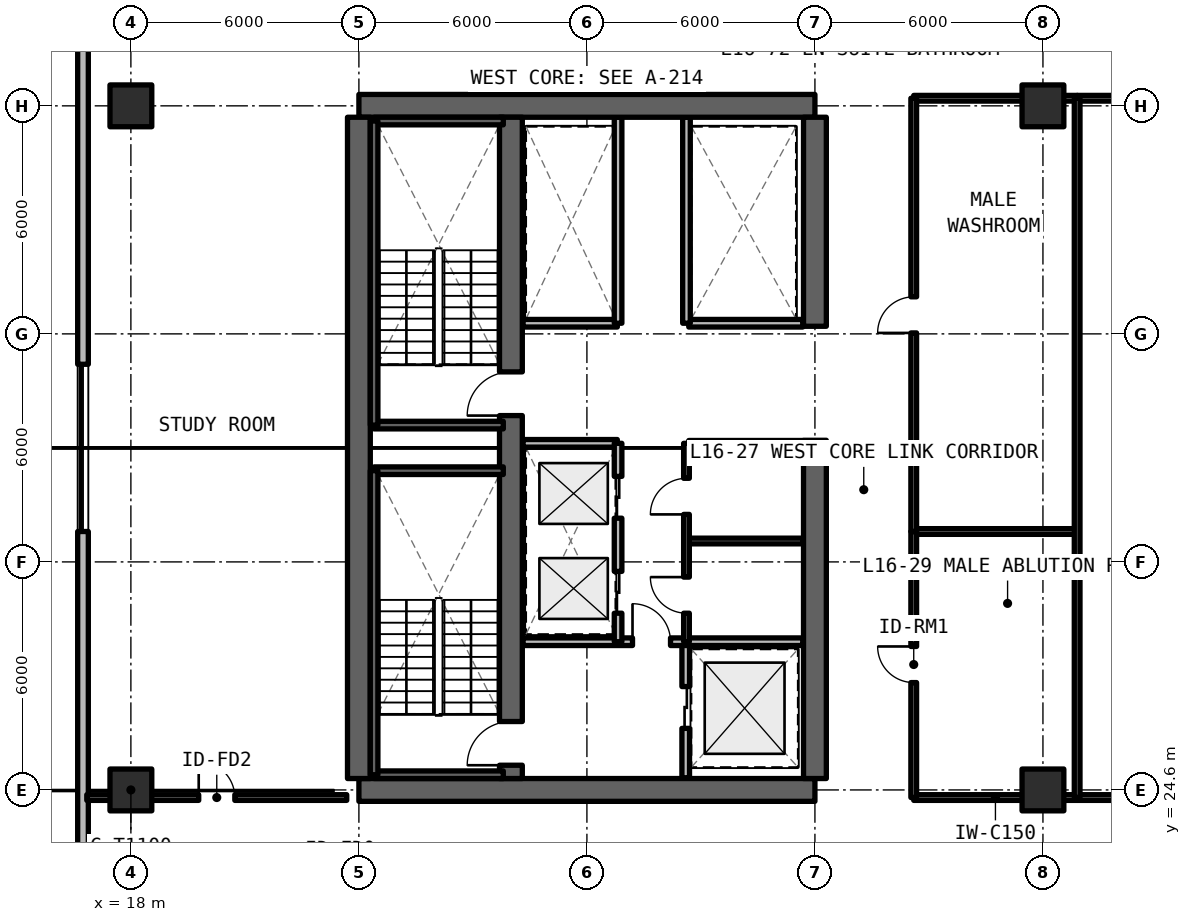
"""IFC4 building model, lengths in metres.
Left out: names, types, materials, properties, quantities, classifications, styles, units other than length and angle.
Written with IfcOpenShell. Run it as: python <this file> out.ifc"""

import sys

from ifc_helpers import new_model, si_unit, direction, frame, frame_2d, origin, origin_2d, place, context, subcontext, project, spatial, rectangle, extrude, element, fill, save


model = new_model("IFC4")
c1 = context("Model", 3, precision=1e-05, world=origin(), true_north=direction((0.0, 1.0)))
c2 = subcontext(c1, "Body", "Model", "MODEL_VIEW")
j1 = project(units=[si_unit("LENGTHUNIT", "METRE"), si_unit("PLANEANGLEUNIT", "RADIAN")], contexts=[c1])
p1 = place(None, origin())
s1 = spatial("IfcSite", under=j1, at=p1, CompositionType="ELEMENT")
p2 = place(p1, origin())
s2 = spatial("IfcBuilding", under=s1, at=p2, CompositionType="ELEMENT")
p3 = place(p2, frame((0.0, 0.0, 58.74)))
s3 = spatial("IfcBuildingStorey", under=s2, at=p3, CompositionType="ELEMENT", Elevation=58.74)
for number, where, z_axis, x_axis in (
    (1, (24.0, 24.6, 0.0), (0.0, 0.0, 1.0), (1.0, 0.0, 0.0)),
    (2, (36.0, 42.6, 0.0), (0.0, 0.0, 1.0), (-1.0, 0.0, 0.0)),
):
    element("IfcWall", number, at=place(p3, frame(where, z_axis=z_axis, x_axis=x_axis)), inside=s3, PredefinedType="SHEAR", context=c2, shape_type="SweptSolid", body=[
        extrude(rectangle(XDim=12.0, YDim=0.6, at=frame_2d((6.0, 0.0))), origin(), (0.0, 0.0, 1.0), 3.63),
    ])
p4 = place(p3, frame((24.0, 24.9, 0.0), z_axis=(0.0, 0.0, 1.0), x_axis=(0.0, 1.0, 0.0)))
e3 = element("IfcWall", 3, at=p4, inside=s3, PredefinedType="SHEAR", context=c2, shape_type="SweptSolid", body=[
    extrude(rectangle(XDim=17.4, YDim=0.6, at=frame_2d((8.7, 0.0))), origin(), (0.0, 0.0, 1.0), 3.63),
])
p5 = place(p3, frame((36.0, 24.9, 0.0), z_axis=(0.0, 0.0, 1.0), x_axis=(0.0, 1.0, 0.0)))
e4 = element("IfcWall", 4, at=p5, inside=s3, PredefinedType="SHEAR", context=c2, shape_type="SweptSolid", body=[
    extrude(rectangle(XDim=8.9, YDim=0.6, at=frame_2d((4.45, 0.0))), origin(), (0.0, 0.0, 1.0), 3.63),
])
p6 = place(p3, frame((36.0, 36.8, 0.0), z_axis=(0.0, 0.0, 1.0), x_axis=(0.0, 1.0, 0.0)))
e5 = element("IfcWall", 5, at=p6, inside=s3, PredefinedType="SHEAR", context=c2, shape_type="SweptSolid", body=[
    extrude(rectangle(XDim=5.5, YDim=0.6, at=frame_2d((2.75, 0.0))), origin(), (0.0, 0.0, 1.0), 3.63),
])
p7 = place(p3, frame((28.0, 24.9, 0.0), z_axis=(0.0, 0.0, 1.0), x_axis=(0.0, 1.0, 0.0)))
e6 = element("IfcWall", 6, at=p7, inside=s3, PredefinedType="SHEAR", context=c2, shape_type="SweptSolid", body=[
    extrude(rectangle(XDim=17.4, YDim=0.6, at=frame_2d((8.7, 0.0))), origin(), (0.0, 0.0, 1.0), 3.63),
])
p8 = place(p7, frame((0.35, 0.0, 0.0)))
e7 = element("IfcOpeningElement", 7, at=p8, cuts=e6, PredefinedType="OPENING", context=c2, shape_type="SweptSolid", body=[
    extrude(rectangle(XDim=1.15, YDim=2.15, at=frame_2d((0.575, 1.075))), frame((0.0, 0.31, 0.0), z_axis=(0.0, -1.0, 0.0), x_axis=(1.0, 0.0, 0.0)), (0.0, 0.0, 1.0), 0.62),
])
p9 = place(p7, frame((9.55, 0.0, 0.0)))
e8 = element("IfcOpeningElement", 8, at=p9, cuts=e6, PredefinedType="OPENING", context=c2, shape_type="SweptSolid", body=[
    extrude(rectangle(XDim=1.15, YDim=2.15, at=frame_2d((0.575, 1.075))), frame((0.0, 0.31, 0.0), z_axis=(0.0, -1.0, 0.0), x_axis=(1.0, 0.0, 0.0)), (0.0, 0.0, 1.0), 0.62),
])
for number, where, z_axis, x_axis in (
    (9, (18.0, 24.6, 0.0), (0.0, 0.0, 1.0), (1.0, 0.0, 0.0)),
    (10, (18.0, 42.6, 0.0), (0.0, 0.0, 1.0), (1.0, 0.0, 0.0)),
    (11, (42.0, 24.6, 0.0), (0.0, 0.0, 1.0), (1.0, 0.0, 0.0)),
    (12, (42.0, 42.6, 0.0), (0.0, 0.0, 1.0), (1.0, 0.0, 0.0)),
):
    element("IfcColumn", number, at=place(p3, frame(where, z_axis=z_axis, x_axis=x_axis)), inside=s3, PredefinedType="COLUMN", context=c2, shape_type="SweptSolid", body=[
        extrude(rectangle(XDim=1.1, YDim=1.1, at=origin_2d()), origin(), (0.0, 0.0, 1.0), 3.63),
    ])
p10 = place(p3, frame((16.74, 55.342, 0.0), z_axis=(0.0, 0.0, 1.0), x_axis=(0.0, -1.0, 0.0)))
e13 = element("IfcWall", 13, at=p10, inside=s3, PredefinedType="SOLIDWALL", context=c2, shape_type="SweptSolid", body=[
    extrude(rectangle(XDim=43.484, YDim=0.28, at=frame_2d((21.742, 0.0))), origin(), (0.0, 0.0, 1.0), 3.41),
])
p11 = place(p10, frame((19.542, 0.0, 0.78)))
e14 = element("IfcOpeningElement", 14, at=p11, cuts=e13, PredefinedType="OPENING", context=c2, shape_type="SweptSolid", body=[
    extrude(rectangle(XDim=4.4, YDim=1.66, at=frame_2d((2.2, 0.83))), frame((0.0, 0.15, 0.0), z_axis=(0.0, -1.0, 0.0), x_axis=(1.0, 0.0, 0.0)), (0.0, 0.0, 1.0), 0.3),
])
p12 = place(p10, frame((37.573, 0.0, 0.78)))
e15 = element("IfcOpeningElement", 15, at=p12, cuts=e13, PredefinedType="OPENING", context=c2, shape_type="SweptSolid", body=[
    extrude(rectangle(XDim=4.4, YDim=1.66, at=frame_2d((2.2, 0.83))), frame((0.0, 0.15, 0.0), z_axis=(0.0, -1.0, 0.0), x_axis=(1.0, 0.0, 0.0)), (0.0, 0.0, 1.0), 0.3),
])
p13 = place(p3, frame((32.6, 24.92, 0.0), z_axis=(0.0, 0.0, 1.0), x_axis=(0.0, 1.0, 0.0)))
e16 = element("IfcWall", 16, at=p13, inside=s3, PredefinedType="SOLIDWALL", context=c2, shape_type="SweptSolid", body=[
    extrude(rectangle(XDim=3.58, YDim=0.2, at=frame_2d((1.79, 0.0))), origin(), (0.0, 0.0, 1.0), 2.63),
])
p14 = place(p13, frame((1.3, 0.0, 0.0)))
e17 = element("IfcOpeningElement", 17, at=p14, cuts=e16, PredefinedType="OPENING", context=c2, shape_type="SweptSolid", body=[
    extrude(rectangle(XDim=1.1, YDim=2.2, at=frame_2d((0.55, 1.1))), frame((0.0, 0.11, 0.0), z_axis=(0.0, -1.0, 0.0), x_axis=(1.0, 0.0, 0.0)), (0.0, 0.0, 1.0), 0.22),
])
p15 = place(p3, frame((28.32, 28.5, 0.0), z_axis=(0.0, 0.0, 1.0), x_axis=(1.0, 0.0, 0.0)))
e18 = element("IfcWall", 18, at=p15, inside=s3, PredefinedType="SOLIDWALL", context=c2, shape_type="SweptSolid", body=[
    extrude(rectangle(XDim=7.36, YDim=0.2, at=frame_2d((3.68, 0.0))), origin(), (0.0, 0.0, 1.0), 2.63),
])
p16 = place(p15, frame((2.88, 0.0, 0.0)))
e19 = element("IfcOpeningElement", 19, at=p16, cuts=e18, PredefinedType="OPENING", context=c2, shape_type="SweptSolid", body=[
    extrude(rectangle(XDim=1.0, YDim=2.15, at=frame_2d((0.5, 1.075))), frame((0.0, 0.11, 0.0), z_axis=(0.0, -1.0, 0.0), x_axis=(1.0, 0.0, 0.0)), (0.0, 0.0, 1.0), 0.22),
])
p17 = place(p3, frame((28.32, 33.72, 0.0), z_axis=(0.0, 0.0, 1.0), x_axis=(1.0, 0.0, 0.0)))
e20 = element("IfcWall", 20, at=p17, inside=s3, PredefinedType="SOLIDWALL", context=c2, shape_type="SweptSolid", body=[
    extrude(rectangle(XDim=2.48, YDim=0.2, at=frame_2d((1.24, 0.0))), origin(), (0.0, 0.0, 1.0), 2.63),
])
p18 = place(p3, frame((30.82, 28.5, 0.0), z_axis=(0.0, 0.0, 1.0), x_axis=(0.0, 1.0, 0.0)))
e21 = element("IfcWall", 21, at=p18, inside=s3, PredefinedType="SOLIDWALL", context=c2, shape_type="SweptSolid", body=[
    extrude(rectangle(XDim=5.22, YDim=0.2, at=frame_2d((2.61, 0.0))), origin(), (0.0, 0.0, 1.0), 2.63),
])
p19 = place(p18, frame((0.75, 0.0, 0.0)))
e22 = element("IfcOpeningElement", 22, at=p19, cuts=e21, PredefinedType="OPENING", context=c2, shape_type="SweptSolid", body=[
    extrude(rectangle(XDim=1.1, YDim=2.2, at=frame_2d((0.55, 1.1))), frame((0.0, 0.11, 0.0), z_axis=(0.0, -1.0, 0.0), x_axis=(1.0, 0.0, 0.0)), (0.0, 0.0, 1.0), 0.22),
])
p20 = place(p18, frame((3.25, 0.0, 0.0)))
e23 = element("IfcOpeningElement", 23, at=p20, cuts=e21, PredefinedType="OPENING", context=c2, shape_type="SweptSolid", body=[
    extrude(rectangle(XDim=1.1, YDim=2.2, at=frame_2d((0.55, 1.1))), frame((0.0, 0.11, 0.0), z_axis=(0.0, -1.0, 0.0), x_axis=(1.0, 0.0, 0.0)), (0.0, 0.0, 1.0), 0.22),
])
for number, where, z_axis, x_axis in (
    (24, (32.68, 31.15, 0.0), (0.0, 0.0, 1.0), (1.0, 0.0, 0.0)),
    (25, (32.68, 33.72, 0.0), (0.0, 0.0, 1.0), (1.0, 0.0, 0.0)),
):
    element("IfcWall", number, at=place(p3, frame(where, z_axis=z_axis, x_axis=x_axis)), inside=s3, PredefinedType="SOLIDWALL", context=c2, shape_type="SweptSolid", body=[
        extrude(rectangle(XDim=3.0, YDim=0.15, at=frame_2d((1.5, 0.0))), origin(), (0.0, 0.0, 1.0), 2.63),
    ])
p21 = place(p3, frame((32.62, 28.5, 0.0), z_axis=(0.0, 0.0, 1.0), x_axis=(0.0, 1.0, 0.0)))
e26 = element("IfcWall", 26, at=p21, inside=s3, PredefinedType="SOLIDWALL", context=c2, shape_type="SweptSolid", body=[
    extrude(rectangle(XDim=5.22, YDim=0.15, at=frame_2d((2.61, 0.0))), origin(), (0.0, 0.0, 1.0), 2.63),
])
p22 = place(p21, frame((0.75, 0.0, 0.0)))
e27 = element("IfcOpeningElement", 27, at=p22, cuts=e26, PredefinedType="OPENING", context=c2, shape_type="SweptSolid", body=[
    extrude(rectangle(XDim=0.95, YDim=2.15, at=frame_2d((0.475, 1.075))), frame((0.0, 0.085, 0.0), z_axis=(0.0, -1.0, 0.0), x_axis=(1.0, 0.0, 0.0)), (0.0, 0.0, 1.0), 0.17),
])
p23 = place(p21, frame((3.35, 0.0, 0.0)))
e28 = element("IfcOpeningElement", 28, at=p23, cuts=e26, PredefinedType="OPENING", context=c2, shape_type="SweptSolid", body=[
    extrude(rectangle(XDim=0.95, YDim=2.15, at=frame_2d((0.475, 1.075))), frame((0.0, 0.085, 0.0), z_axis=(0.0, -1.0, 0.0), x_axis=(1.0, 0.0, 0.0)), (0.0, 0.0, 1.0), 0.17),
])
p24 = place(p3, frame((28.32, 36.88, 0.0), z_axis=(0.0, 0.0, 1.0), x_axis=(1.0, 0.0, 0.0)))
e29 = element("IfcWall", 29, at=p24, inside=s3, PredefinedType="SOLIDWALL", context=c2, shape_type="SweptSolid", body=[
    extrude(rectangle(XDim=2.48, YDim=0.2, at=frame_2d((1.24, 0.0))), origin(), (0.0, 0.0, 1.0), 2.63),
])
p25 = place(p3, frame((30.82, 36.88, 0.0), z_axis=(0.0, 0.0, 1.0), x_axis=(0.0, 1.0, 0.0)))
e30 = element("IfcWall", 30, at=p25, inside=s3, PredefinedType="SOLIDWALL", context=c2, shape_type="SweptSolid", body=[
    extrude(rectangle(XDim=5.42, YDim=0.2, at=frame_2d((2.71, 0.0))), origin(), (0.0, 0.0, 1.0), 2.63),
])
p26 = place(p3, frame((32.68, 36.88, 0.0), z_axis=(0.0, 0.0, 1.0), x_axis=(1.0, 0.0, 0.0)))
e31 = element("IfcWall", 31, at=p26, inside=s3, PredefinedType="SOLIDWALL", context=c2, shape_type="SweptSolid", body=[
    extrude(rectangle(XDim=3.0, YDim=0.2, at=frame_2d((1.5, 0.0))), origin(), (0.0, 0.0, 1.0), 2.63),
])
p27 = place(p3, frame((32.62, 36.88, 0.0), z_axis=(0.0, 0.0, 1.0), x_axis=(0.0, 1.0, 0.0)))
e32 = element("IfcWall", 32, at=p27, inside=s3, PredefinedType="SOLIDWALL", context=c2, shape_type="SweptSolid", body=[
    extrude(rectangle(XDim=5.42, YDim=0.2, at=frame_2d((2.71, 0.0))), origin(), (0.0, 0.0, 1.0), 2.63),
])
p28 = place(p3, frame((38.6, 24.4, 0.0), z_axis=(0.0, 0.0, 1.0), x_axis=(1.0, 0.0, 0.0)))
e33 = element("IfcWall", 33, at=p28, inside=s3, PredefinedType="SOLIDWALL", context=c2, shape_type="SweptSolid", body=[
    extrude(rectangle(XDim=4.3, YDim=0.15, at=frame_2d((2.15, 0.0))), origin(), (0.0, 0.0, 1.0), 2.625),
])
p29 = place(p3, frame((38.6, 31.4, 0.0), z_axis=(0.0, 0.0, 1.0), x_axis=(1.0, 0.0, 0.0)))
e34 = element("IfcWall", 34, at=p29, inside=s3, PredefinedType="SOLIDWALL", context=c2, shape_type="SweptSolid", body=[
    extrude(rectangle(XDim=4.3, YDim=0.15, at=frame_2d((2.15, 0.0))), origin(), (0.0, 0.0, 1.0), 2.63),
])
p30 = place(p3, frame((38.6, 24.4, 0.0), z_axis=(0.0, 0.0, 1.0), x_axis=(0.0, 1.0, 0.0)))
e35 = element("IfcWall", 35, at=p30, inside=s3, PredefinedType="SOLIDWALL", context=c2, shape_type="SweptSolid", body=[
    extrude(rectangle(XDim=7.0, YDim=0.15, at=frame_2d((3.5, 0.0))), origin(), (0.0, 0.0, 1.0), 2.63),
])
p31 = place(p30, frame((3.025, 0.0, 0.0)))
e36 = element("IfcOpeningElement", 36, at=p31, cuts=e35, PredefinedType="OPENING", context=c2, shape_type="SweptSolid", body=[
    extrude(rectangle(XDim=0.95, YDim=2.15, at=frame_2d((0.475, 1.075))), frame((0.0, 0.085, 0.0), z_axis=(0.0, -1.0, 0.0), x_axis=(1.0, 0.0, 0.0)), (0.0, 0.0, 1.0), 0.17),
])
p32 = place(p3, frame((38.6, 42.8, 0.0), z_axis=(0.0, 0.0, 1.0), x_axis=(1.0, 0.0, 0.0)))
e37 = element("IfcWall", 37, at=p32, inside=s3, PredefinedType="SOLIDWALL", context=c2, shape_type="SweptSolid", body=[
    extrude(rectangle(XDim=4.3, YDim=0.15, at=frame_2d((2.15, 0.0))), origin(), (0.0, 0.0, 1.0), 2.625),
])
p33 = place(p3, frame((38.6, 31.4, 0.0), z_axis=(0.0, 0.0, 1.0), x_axis=(0.0, 1.0, 0.0)))
e38 = element("IfcWall", 38, at=p33, inside=s3, PredefinedType="SOLIDWALL", context=c2, shape_type="SweptSolid", body=[
    extrude(rectangle(XDim=11.4, YDim=0.15, at=frame_2d((5.7, 0.0))), origin(), (0.0, 0.0, 1.0), 2.63),
])
p34 = place(p33, frame((5.225, 0.0, 0.0)))
e39 = element("IfcOpeningElement", 39, at=p34, cuts=e38, PredefinedType="OPENING", context=c2, shape_type="SweptSolid", body=[
    extrude(rectangle(XDim=0.95, YDim=2.15, at=frame_2d((0.475, 1.075))), frame((0.0, 0.085, 0.0), z_axis=(0.0, -1.0, 0.0), x_axis=(1.0, 0.0, 0.0)), (0.0, 0.0, 1.0), 0.17),
])
p35 = place(p3, frame((42.9, 24.4, 0.0), z_axis=(0.0, 0.0, 1.0), x_axis=(1.0, 0.0, 0.0)))
e40 = element("IfcWall", 40, at=p35, inside=s3, PredefinedType="SOLIDWALL", context=c2, shape_type="SweptSolid", body=[
    extrude(rectangle(XDim=27.4, YDim=0.15, at=frame_2d((13.7, 0.0))), origin(), (0.0, 0.0, 1.0), 2.625),
])
p36 = place(p35, frame((13.0, 0.0, 0.0)))
e41 = element("IfcOpeningElement", 41, at=p36, cuts=e40, PredefinedType="OPENING", context=c2, shape_type="SweptSolid", body=[
    extrude(rectangle(XDim=1.4, YDim=2.15, at=frame_2d((0.7, 1.075))), frame((0.0, 0.085, 0.0), z_axis=(0.0, -1.0, 0.0), x_axis=(1.0, 0.0, 0.0)), (0.0, 0.0, 1.0), 0.17),
])
p37 = place(p3, frame((42.9, 42.8, 0.0), z_axis=(0.0, 0.0, 1.0), x_axis=(1.0, 0.0, 0.0)))
e42 = element("IfcWall", 42, at=p37, inside=s3, PredefinedType="SOLIDWALL", context=c2, shape_type="SweptSolid", body=[
    extrude(rectangle(XDim=27.4, YDim=0.15, at=frame_2d((13.7, 0.0))), origin(), (0.0, 0.0, 1.0), 2.625),
])
p38 = place(p3, frame((42.9, 24.4, 0.0), z_axis=(0.0, 0.0, 1.0), x_axis=(0.0, 1.0, 0.0)))
e43 = element("IfcWall", 43, at=p38, inside=s3, PredefinedType="SOLIDWALL", context=c2, shape_type="SweptSolid", body=[
    extrude(rectangle(XDim=18.4, YDim=0.15, at=frame_2d((9.2, 0.0))), origin(), (0.0, 0.0, 1.0), 2.63),
])
p39 = place(p3, frame((16.84, 24.4, 0.0), z_axis=(0.0, 0.0, 1.0), x_axis=(1.0, 0.0, 0.0)))
e44 = element("IfcWall", 44, at=p39, inside=s3, PredefinedType="SOLIDWALL", context=c2, shape_type="SweptSolid", body=[
    extrude(rectangle(XDim=6.84, YDim=0.15, at=frame_2d((3.42, 0.0))), origin(), (0.0, 0.0, 1.0), 2.625),
])
p40 = place(p39, frame((2.945, 0.0, 0.0)))
e45 = element("IfcOpeningElement", 45, at=p40, cuts=e44, PredefinedType="OPENING", context=c2, shape_type="SweptSolid", body=[
    extrude(rectangle(XDim=0.95, YDim=2.15, at=frame_2d((0.475, 1.075))), frame((0.0, 0.085, 0.0), z_axis=(0.0, -1.0, 0.0), x_axis=(1.0, 0.0, 0.0)), (0.0, 0.0, 1.0), 0.17),
])
for number, where, z_axis, x_axis in (
    (46, (24.4, 25.0, 0.0), (0.0, 0.0, 1.0), (1.0, 0.0, 0.0)),
    (47, (27.8, 33.0, 0.0), (0.0, 0.0, 1.0), (-1.0, 0.0, 0.0)),
):
    element("IfcWall", number, at=place(p3, frame(where, z_axis=z_axis, x_axis=x_axis)), inside=s3, PredefinedType="SOLIDWALL", context=c2, shape_type="SweptSolid", body=[
        extrude(rectangle(XDim=3.4, YDim=0.2, at=frame_2d((1.7, 0.0))), origin(), (0.0, 0.0, 1.0), 3.63),
    ])
p41 = place(p3, frame((24.4, 33.0, 0.0), z_axis=(0.0, 0.0, 1.0), x_axis=(0.0, -1.0, 0.0)))
e48 = element("IfcWall", 48, at=p41, inside=s3, PredefinedType="SOLIDWALL", context=c2, shape_type="SweptSolid", body=[
    extrude(rectangle(XDim=8.0, YDim=0.2, at=frame_2d((4.0, 0.0))), origin(), (0.0, 0.0, 1.0), 3.63),
])
for number, where, z_axis, x_axis in (
    (49, (24.4, 34.2, 0.0), (0.0, 0.0, 1.0), (1.0, 0.0, 0.0)),
    (50, (27.8, 42.2, 0.0), (0.0, 0.0, 1.0), (-1.0, 0.0, 0.0)),
):
    element("IfcWall", number, at=place(p3, frame(where, z_axis=z_axis, x_axis=x_axis)), inside=s3, PredefinedType="SOLIDWALL", context=c2, shape_type="SweptSolid", body=[
        extrude(rectangle(XDim=3.4, YDim=0.2, at=frame_2d((1.7, 0.0))), origin(), (0.0, 0.0, 1.0), 3.63),
    ])
p42 = place(p3, frame((24.4, 42.2, 0.0), z_axis=(0.0, 0.0, 1.0), x_axis=(0.0, -1.0, 0.0)))
e51 = element("IfcWall", 51, at=p42, inside=s3, PredefinedType="SOLIDWALL", context=c2, shape_type="SweptSolid", body=[
    extrude(rectangle(XDim=8.0, YDim=0.2, at=frame_2d((4.0, 0.0))), origin(), (0.0, 0.0, 1.0), 3.63),
])
p43 = place(p11, origin())
e52 = element("IfcWindow", 52, at=p43, inside=s3, PartitioningType="SINGLE_PANEL", PredefinedType="WINDOW", context=c2, shape_type="SweptSolid", body=[
    extrude(rectangle(XDim=4.4, YDim=1.66, at=frame_2d((2.2, 0.83))), frame((0.0, 0.03, 0.0), z_axis=(0.0, -1.0, 0.0), x_axis=(1.0, 0.0, 0.0)), (0.0, 0.0, 1.0), 0.06),
])
fill(e14, e52)
p44 = place(p14, origin())
e53 = element("IfcDoor", 53, at=p44, inside=s3, OperationType="SLIDING_TO_LEFT", PredefinedType="DOOR", context=c2, shape_type="SweptSolid", body=[
    extrude(rectangle(XDim=1.1, YDim=2.2, at=frame_2d((0.55, 1.1))), frame((0.0, 0.025, 0.0), z_axis=(0.0, -1.0, 0.0), x_axis=(1.0, 0.0, 0.0)), (0.0, 0.0, 1.0), 0.05),
])
fill(e17, e53)
p45 = place(p16, origin())
e54 = element("IfcDoor", 54, at=p45, inside=s3, OperationType="SINGLE_SWING_LEFT", PredefinedType="DOOR", context=c2, shape_type="SweptSolid", body=[
    extrude(rectangle(XDim=1.0, YDim=2.15, at=frame_2d((0.5, 1.075))), frame((0.0, 0.025, 0.0), z_axis=(0.0, -1.0, 0.0), x_axis=(1.0, 0.0, 0.0)), (0.0, 0.0, 1.0), 0.05),
])
fill(e19, e54)
p46 = place(p19, origin())
e55 = element("IfcDoor", 55, at=p46, inside=s3, OperationType="SLIDING_TO_LEFT", PredefinedType="DOOR", context=c2, shape_type="SweptSolid", body=[
    extrude(rectangle(XDim=1.1, YDim=2.2, at=frame_2d((0.55, 1.1))), frame((0.0, 0.025, 0.0), z_axis=(0.0, -1.0, 0.0), x_axis=(1.0, 0.0, 0.0)), (0.0, 0.0, 1.0), 0.05),
])
fill(e22, e55)
p47 = place(p20, origin())
e56 = element("IfcDoor", 56, at=p47, inside=s3, OperationType="SLIDING_TO_RIGHT", PredefinedType="DOOR", context=c2, shape_type="SweptSolid", body=[
    extrude(rectangle(XDim=1.1, YDim=2.2, at=frame_2d((0.55, 1.1))), frame((0.0, 0.025, 0.0), z_axis=(0.0, -1.0, 0.0), x_axis=(1.0, 0.0, 0.0)), (0.0, 0.0, 1.0), 0.05),
])
fill(e23, e56)
p48 = place(p22, origin())
e57 = element("IfcDoor", 57, at=p48, inside=s3, OperationType="SINGLE_SWING_RIGHT", PredefinedType="DOOR", context=c2, shape_type="SweptSolid", body=[
    extrude(rectangle(XDim=0.95, YDim=2.15, at=frame_2d((0.475, 1.075))), frame((0.0, 0.025, 0.0), z_axis=(0.0, -1.0, 0.0), x_axis=(1.0, 0.0, 0.0)), (0.0, 0.0, 1.0), 0.05),
])
fill(e27, e57)
p49 = place(p23, origin())
e58 = element("IfcDoor", 58, at=p49, inside=s3, OperationType="SINGLE_SWING_LEFT", PredefinedType="DOOR", context=c2, shape_type="SweptSolid", body=[
    extrude(rectangle(XDim=0.95, YDim=2.15, at=frame_2d((0.475, 1.075))), frame((0.0, 0.025, 0.0), z_axis=(0.0, -1.0, 0.0), x_axis=(1.0, 0.0, 0.0)), (0.0, 0.0, 1.0), 0.05),
])
fill(e28, e58)
p50 = place(p31, origin())
e59 = element("IfcDoor", 59, at=p50, inside=s3, OperationType="SINGLE_SWING_RIGHT", PredefinedType="DOOR", context=c2, shape_type="SweptSolid", body=[
    extrude(rectangle(XDim=0.95, YDim=2.15, at=frame_2d((0.475, 1.075))), frame((0.0, 0.025, 0.0), z_axis=(0.0, -1.0, 0.0), x_axis=(1.0, 0.0, 0.0)), (0.0, 0.0, 1.0), 0.05),
])
fill(e36, e59)
p51 = place(p34, origin())
e60 = element("IfcDoor", 60, at=p51, inside=s3, OperationType="SINGLE_SWING_LEFT", PredefinedType="DOOR", context=c2, shape_type="SweptSolid", body=[
    extrude(rectangle(XDim=0.95, YDim=2.15, at=frame_2d((0.475, 1.075))), frame((0.0, 0.025, 0.0), z_axis=(0.0, -1.0, 0.0), x_axis=(1.0, 0.0, 0.0)), (0.0, 0.0, 1.0), 0.05),
])
fill(e39, e60)
p52 = place(p40, origin())
e61 = element("IfcDoor", 61, at=p52, inside=s3, OperationType="SINGLE_SWING_LEFT", PredefinedType="DOOR", context=c2, shape_type="SweptSolid", body=[
    extrude(rectangle(XDim=0.95, YDim=2.15, at=frame_2d((0.475, 1.075))), frame((0.0, 0.025, 0.0), z_axis=(0.0, -1.0, 0.0), x_axis=(1.0, 0.0, 0.0)), (0.0, 0.0, 1.0), 0.05),
])
fill(e45, e61)
p53 = place(p8, origin())
e62 = element("IfcDoor", 62, at=p53, inside=s3, OperationType="SINGLE_SWING_RIGHT", PredefinedType="DOOR", context=c2, shape_type="SweptSolid", body=[
    extrude(rectangle(XDim=1.15, YDim=2.15, at=frame_2d((0.575, 1.075))), frame((0.0, 0.025, 0.0), z_axis=(0.0, -1.0, 0.0), x_axis=(1.0, 0.0, 0.0)), (0.0, 0.0, 1.0), 0.05),
])
fill(e7, e62)
p54 = place(p9, origin())
e63 = element("IfcDoor", 63, at=p54, inside=s3, OperationType="SINGLE_SWING_LEFT", PredefinedType="DOOR", context=c2, shape_type="SweptSolid", body=[
    extrude(rectangle(XDim=1.15, YDim=2.15, at=frame_2d((0.575, 1.075))), frame((0.0, 0.025, 0.0), z_axis=(0.0, -1.0, 0.0), x_axis=(1.0, 0.0, 0.0)), (0.0, 0.0, 1.0), 0.05),
])
fill(e8, e63)
save(model, sys.argv[1])
